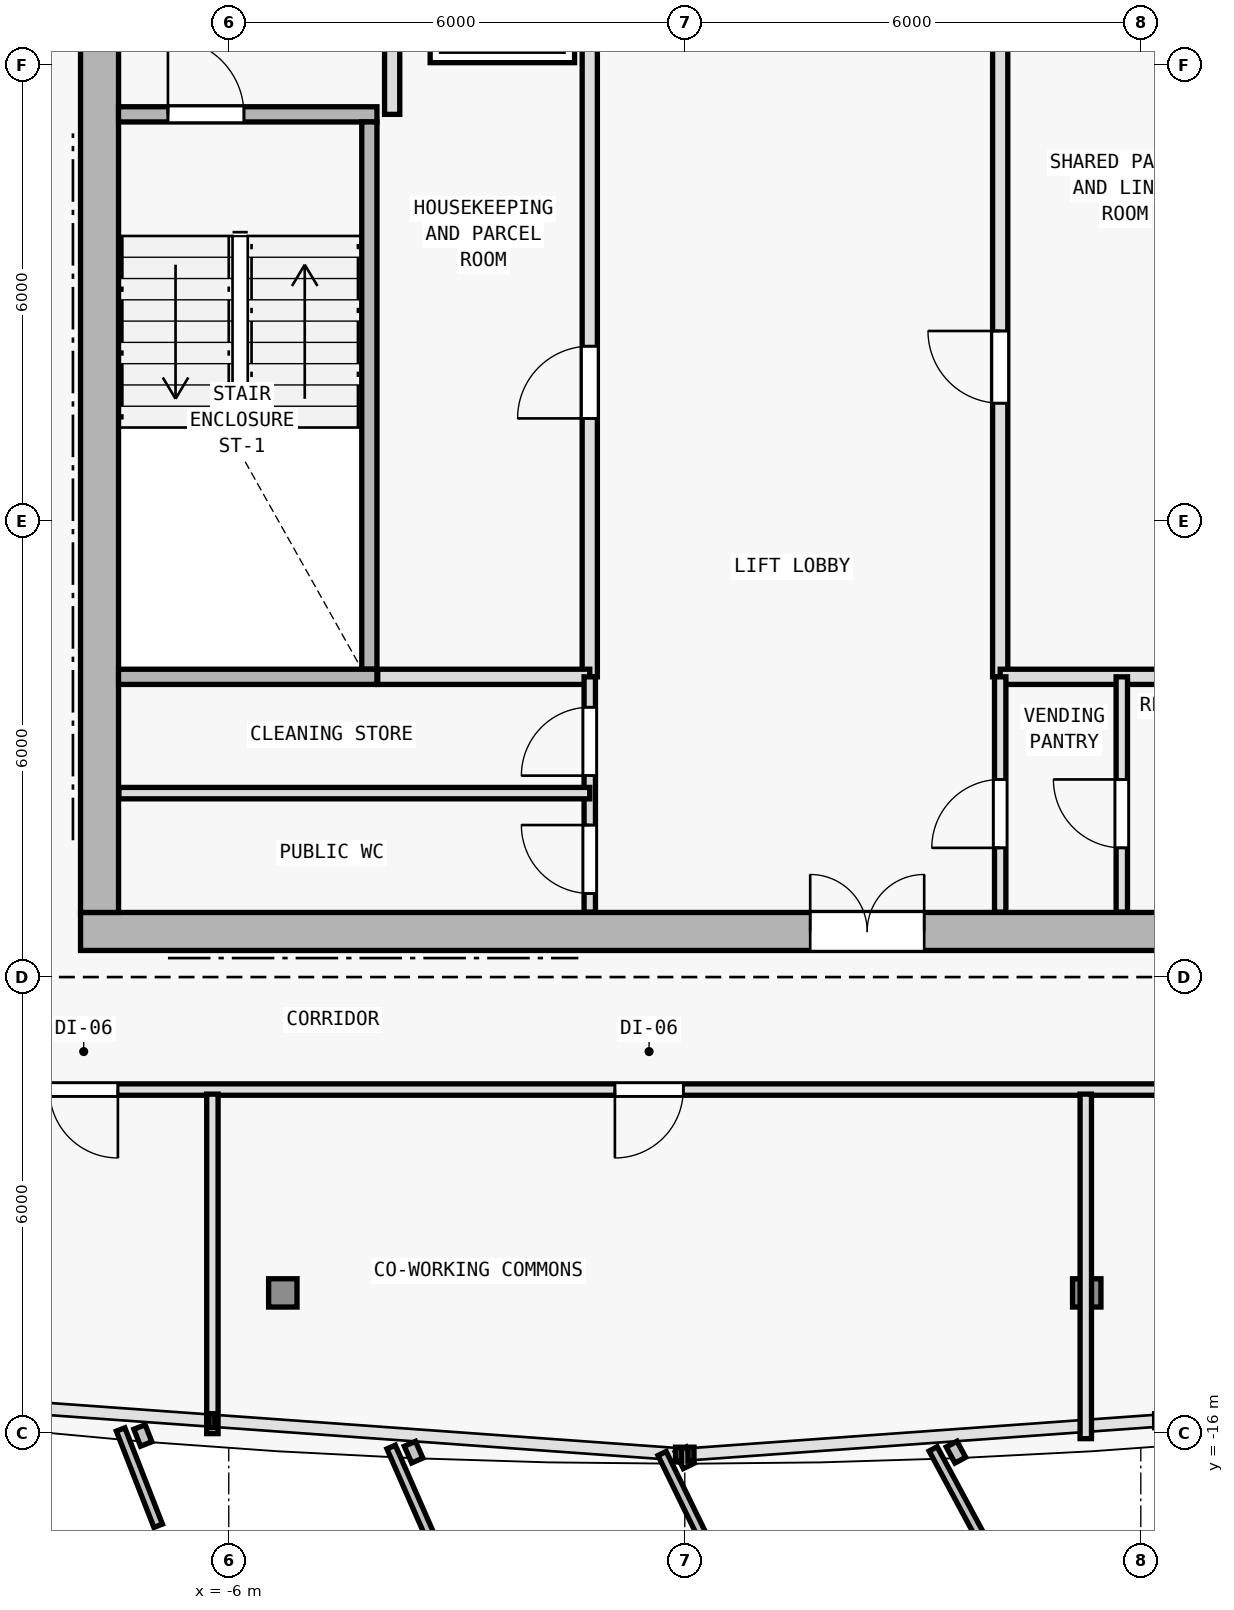
"""IFC4 building model, lengths in metres.
Left out: names, types, materials, properties, quantities, classifications, styles, units other than length and angle.
Written with IfcOpenShell. Run it as: python <this file> out.ifc"""

import sys

from ifc_helpers import new_model, si_unit, direction, frame, frame_2d, origin, origin_2d, place, context, subcontext, project, spatial, rectangle, i_section, extrude, element, fill, save


model = new_model("IFC4")
c1 = context("Model", 3, precision=1e-05, world=origin(), true_north=direction((0.0, 1.0)))
c2 = subcontext(c1, "Body", "Model", "MODEL_VIEW")
j1 = project(units=[si_unit("LENGTHUNIT", "METRE"), si_unit("PLANEANGLEUNIT", "RADIAN")], contexts=[c1])
p1 = place(None, origin())
s1 = spatial("IfcSite", under=j1, at=p1, CompositionType="ELEMENT")
p2 = place(p1, origin())
s2 = spatial("IfcBuilding", under=s1, at=p2, CompositionType="ELEMENT")
p3 = place(p2, frame((0.0, 0.0, 258.0)))
s3 = spatial("IfcBuildingStorey", under=s2, at=p3, CompositionType="ELEMENT", Elevation=258.0)
for number, where, z_axis, x_axis in (
    (1, (-7.7, -9.4, 0.0), (0.0, 0.0, 1.0), (1.0, 0.0, 0.0)),
    (2, (0.0, -9.4, 0.0), (0.0, 0.0, 1.0), (1.0, 0.0, 0.0)),
    (3, (-7.7, 2.0, 0.0), (0.0, 0.0, 1.0), (1.0, 0.0, 0.0)),
):
    element("IfcColumn", number, at=place(p3, frame(where, z_axis=z_axis, x_axis=x_axis)), inside=s3, PredefinedType="COLUMN", context=c2, shape_type="SweptSolid", body=[
        extrude(i_section(OverallWidth=0.374, OverallDepth=0.372, WebThickness=0.012, FlangeThickness=0.02, FilletRadius=0.015, at=origin_2d()), origin(), (0.0, 0.0, 1.0), 3.6),
    ])
for number, where, z_axis, x_axis in (
    (4, (-5.289, -14.155, 0.006), (0.007, 0.035, 0.999), (-0.981, 0.193, 0.0)),
    (5, (5.289, -14.155, 0.006), (-0.007, 0.035, 0.999), (-0.981, -0.193, 0.0)),
):
    element("IfcColumn", number, at=place(p3, frame(where, z_axis=z_axis, x_axis=x_axis)), inside=s3, PredefinedType="COLUMN", context=c2, shape_type="SweptSolid", body=[
        extrude(i_section(OverallWidth=0.374, OverallDepth=0.372, WebThickness=0.012, FlangeThickness=0.02, FilletRadius=0.015, at=origin_2d()), origin(), (0.0, 0.0, 1.0), 3.591),
    ])
p4 = place(p3, frame((-7.95, -9.4, 0.0), z_axis=(0.0, 0.0, 1.0), x_axis=(1.0, 0.0, 0.0)))
e6 = element("IfcWall", 6, at=p4, inside=s3, PredefinedType="SHEAR", context=c2, shape_type="SweptSolid", body=[
    extrude(rectangle(XDim=15.9, YDim=0.5, at=frame_2d((7.95, 0.0))), origin(), (0.0, 0.0, 1.0), 3.35),
])
p5 = place(p4, frame((9.6, 0.0, 0.0)))
e7 = element("IfcOpeningElement", 7, at=p5, cuts=e6, PredefinedType="OPENING", context=c2, shape_type="SweptSolid", body=[
    extrude(rectangle(XDim=1.5, YDim=2.2, at=frame_2d((0.75, 1.1))), frame((0.0, 0.26, 0.0), z_axis=(0.0, -1.0, 0.0), x_axis=(1.0, 0.0, 0.0)), (0.0, 0.0, 1.0), 0.52),
])
p6 = place(p3, frame((-7.7, -9.15, 0.0), z_axis=(0.0, 0.0, 1.0), x_axis=(0.0, 1.0, 0.0)))
e8 = element("IfcWall", 8, at=p6, inside=s3, PredefinedType="SHEAR", context=c2, shape_type="SweptSolid", body=[
    extrude(rectangle(XDim=19.1, YDim=0.5, at=frame_2d((9.55, 0.0))), origin(), (0.0, 0.0, 1.0), 3.35),
])
p7 = place(p6, frame((12.7, 0.0, 0.0)))
e9 = element("IfcOpeningElement", 9, at=p7, cuts=e8, PredefinedType="OPENING", context=c2, shape_type="SweptSolid", body=[
    extrude(rectangle(XDim=1.1, YDim=2.15, at=frame_2d((0.55, 1.075))), frame((0.0, 0.26, 0.0), z_axis=(0.0, -1.0, 0.0), x_axis=(1.0, 0.0, 0.0)), (0.0, 0.0, 1.0), 0.52),
])
p8 = place(p3, frame((-7.45, 1.35, 0.0), z_axis=(0.0, 0.0, 1.0), x_axis=(1.0, 0.0, 0.0)))
e10 = element("IfcWall", 10, at=p8, inside=s3, PredefinedType="SOLIDWALL", context=c2, shape_type="SweptSolid", body=[
    extrude(rectangle(XDim=3.4, YDim=0.2, at=frame_2d((1.7, 0.0))), origin(), (0.0, 0.0, 1.0), 3.35),
])
p9 = place(p8, frame((0.65, 0.0, 0.0)))
e11 = element("IfcOpeningElement", 11, at=p9, cuts=e10, PredefinedType="OPENING", context=c2, shape_type="SweptSolid", body=[
    extrude(rectangle(XDim=1.0, YDim=2.15, at=frame_2d((0.5, 1.075))), frame((0.0, 0.11, 0.0), z_axis=(0.0, -1.0, 0.0), x_axis=(1.0, 0.0, 0.0)), (0.0, 0.0, 1.0), 0.22),
])
p10 = place(p3, frame((-4.15, -5.95, 0.0), z_axis=(0.0, 0.0, 1.0), x_axis=(0.0, 1.0, 0.0)))
e12 = element("IfcWall", 12, at=p10, inside=s3, PredefinedType="SOLIDWALL", context=c2, shape_type="SweptSolid", body=[
    extrude(rectangle(XDim=7.2, YDim=0.2, at=frame_2d((3.6, 0.0))), origin(), (0.0, 0.0, 1.0), 3.35),
])
p11 = place(p3, frame((-3.85, 1.35, 0.0), z_axis=(0.0, 0.0, 1.0), x_axis=(0.0, 1.0, 0.0)))
e13 = element("IfcWall", 13, at=p11, inside=s3, PredefinedType="SOLIDWALL", context=c2, shape_type="SweptSolid", body=[
    extrude(rectangle(XDim=8.595, YDim=0.2, at=frame_2d((4.297, 0.0))), origin(), (0.0, 0.0, 1.0), 3.35),
])
p12 = place(p11, frame((1.5, 0.0, 0.0)))
e14 = element("IfcOpeningElement", 14, at=p12, cuts=e13, PredefinedType="OPENING", context=c2, shape_type="SweptSolid", body=[
    extrude(rectangle(XDim=1.0, YDim=2.15, at=frame_2d((0.5, 1.075))), frame((0.0, 0.11, 0.0), z_axis=(0.0, -1.0, 0.0), x_axis=(1.0, 0.0, 0.0)), (0.0, 0.0, 1.0), 0.22),
])
p13 = place(p11, frame((3.18, 0.0, 0.0)))
e15 = element("IfcOpeningElement", 15, at=p13, cuts=e13, PredefinedType="OPENING", context=c2, shape_type="SweptSolid", body=[
    extrude(rectangle(XDim=1.0, YDim=2.15, at=frame_2d((0.5, 1.075))), frame((0.0, 0.11, 0.0), z_axis=(0.0, -1.0, 0.0), x_axis=(1.0, 0.0, 0.0)), (0.0, 0.0, 1.0), 0.22),
])
p14 = place(p3, frame((4.15, -6.05, 0.0), z_axis=(0.0, 0.0, 1.0), x_axis=(0.0, 1.0, 0.0)))
e16 = element("IfcWall", 16, at=p14, inside=s3, PredefinedType="SOLIDWALL", context=c2, shape_type="SweptSolid", body=[
    extrude(rectangle(XDim=8.7, YDim=0.2, at=frame_2d((4.35, 0.0))), origin(), (0.0, 0.0, 1.0), 3.35),
])
p15 = place(p14, frame((3.6, 0.0, 0.0)))
e17 = element("IfcOpeningElement", 17, at=p15, cuts=e16, PredefinedType="OPENING", context=c2, shape_type="SweptSolid", body=[
    extrude(rectangle(XDim=0.95, YDim=2.1, at=frame_2d((0.475, 1.05))), frame((0.0, 0.11, 0.0), z_axis=(0.0, -1.0, 0.0), x_axis=(1.0, 0.0, 0.0)), (0.0, 0.0, 1.0), 0.22),
])
p16 = place(p3, frame((-1.25, -6.05, 0.0), z_axis=(0.0, 0.0, 1.0), x_axis=(0.0, 1.0, 0.0)))
e18 = element("IfcWall", 18, at=p16, inside=s3, PredefinedType="SOLIDWALL", context=c2, shape_type="SweptSolid", body=[
    extrude(rectangle(XDim=8.7, YDim=0.2, at=frame_2d((4.35, 0.0))), origin(), (0.0, 0.0, 1.0), 3.35),
])
p17 = place(p16, frame((3.4, 0.0, 0.0)))
e19 = element("IfcOpeningElement", 19, at=p17, cuts=e18, PredefinedType="OPENING", context=c2, shape_type="SweptSolid", body=[
    extrude(rectangle(XDim=0.95, YDim=2.1, at=frame_2d((0.475, 1.05))), frame((0.0, 0.11, 0.0), z_axis=(0.0, -1.0, 0.0), x_axis=(1.0, 0.0, 0.0)), (0.0, 0.0, 1.0), 0.22),
])
p18 = place(p3, frame((-7.45, -6.05, 0.0), z_axis=(0.0, 0.0, 1.0), x_axis=(1.0, 0.0, 0.0)))
e20 = element("IfcWall", 20, at=p18, inside=s3, PredefinedType="SOLIDWALL", context=c2, shape_type="SweptSolid", body=[
    extrude(rectangle(XDim=3.4, YDim=0.2, at=frame_2d((1.7, 0.0))), origin(), (0.0, 0.0, 1.0), 3.35),
])
p19 = place(p3, frame((-4.04, -6.05, 0.0), z_axis=(0.0, 0.0, 1.0), x_axis=(1.0, 0.0, 0.0)))
e21 = element("IfcWall", 21, at=p19, inside=s3, PredefinedType="SOLIDWALL", context=c2, shape_type="SweptSolid", body=[
    extrude(rectangle(XDim=2.79, YDim=0.2, at=frame_2d((1.395, 0.0))), origin(), (0.0, 0.0, 1.0), 3.35),
])
p20 = place(p3, frame((4.15, -6.05, 0.0), z_axis=(0.0, 0.0, 1.0), x_axis=(1.0, 0.0, 0.0)))
e22 = element("IfcWall", 22, at=p20, inside=s3, PredefinedType="SOLIDWALL", context=c2, shape_type="SweptSolid", body=[
    extrude(rectangle(XDim=3.295, YDim=0.2, at=frame_2d((1.647, 0.0))), origin(), (0.0, 0.0, 1.0), 3.35),
])
p21 = place(p3, frame((-1.25, -9.145, 0.0), z_axis=(0.0, 0.0, 1.0), x_axis=(0.0, 1.0, 0.0)))
e23 = element("IfcWall", 23, at=p21, inside=s3, PredefinedType="PARTITIONING", context=c2, shape_type="SweptSolid", body=[
    extrude(rectangle(XDim=3.095, YDim=0.15, at=frame_2d((1.547, 0.0))), origin(), (0.0, 0.0, 1.0), 3.35),
])
p22 = place(p21, frame((1.795, 0.0, 0.0)))
e24 = element("IfcOpeningElement", 24, at=p22, cuts=e23, PredefinedType="OPENING", context=c2, shape_type="SweptSolid", body=[
    extrude(rectangle(XDim=0.9, YDim=2.1, at=frame_2d((0.45, 1.05))), frame((0.0, 0.085, 0.0), z_axis=(0.0, -1.0, 0.0), x_axis=(1.0, 0.0, 0.0)), (0.0, 0.0, 1.0), 0.17),
])
p23 = place(p21, frame((0.245, 0.0, 0.0)))
e25 = element("IfcOpeningElement", 25, at=p23, cuts=e23, PredefinedType="OPENING", context=c2, shape_type="SweptSolid", body=[
    extrude(rectangle(XDim=0.9, YDim=2.1, at=frame_2d((0.45, 1.05))), frame((0.0, 0.085, 0.0), z_axis=(0.0, -1.0, 0.0), x_axis=(1.0, 0.0, 0.0)), (0.0, 0.0, 1.0), 0.17),
])
p24 = place(p3, frame((4.15, -9.145, 0.0), z_axis=(0.0, 0.0, 1.0), x_axis=(0.0, 1.0, 0.0)))
e26 = element("IfcWall", 26, at=p24, inside=s3, PredefinedType="PARTITIONING", context=c2, shape_type="SweptSolid", body=[
    extrude(rectangle(XDim=3.095, YDim=0.15, at=frame_2d((1.547, 0.0))), origin(), (0.0, 0.0, 1.0), 3.35),
])
p25 = place(p24, frame((0.845, 0.0, 0.0)))
e27 = element("IfcOpeningElement", 27, at=p25, cuts=e26, PredefinedType="OPENING", context=c2, shape_type="SweptSolid", body=[
    extrude(rectangle(XDim=0.9, YDim=2.1, at=frame_2d((0.45, 1.05))), frame((0.0, 0.085, 0.0), z_axis=(0.0, -1.0, 0.0), x_axis=(1.0, 0.0, 0.0)), (0.0, 0.0, 1.0), 0.17),
])
p26 = place(p3, frame((-7.445, -7.58, 0.0), z_axis=(0.0, 0.0, 1.0), x_axis=(1.0, 0.0, 0.0)))
e28 = element("IfcWall", 28, at=p26, inside=s3, PredefinedType="PARTITIONING", context=c2, shape_type="SweptSolid", body=[
    extrude(rectangle(XDim=6.195, YDim=0.15, at=frame_2d((3.098, 0.0))), origin(), (0.0, 0.0, 1.0), 3.35),
])
p27 = place(p3, frame((5.75, -9.145, 0.0), z_axis=(0.0, 0.0, 1.0), x_axis=(0.0, 1.0, 0.0)))
e29 = element("IfcWall", 29, at=p27, inside=s3, PredefinedType="PARTITIONING", context=c2, shape_type="SweptSolid", body=[
    extrude(rectangle(XDim=3.095, YDim=0.15, at=frame_2d((1.547, 0.0))), origin(), (0.0, 0.0, 1.0), 3.35),
])
p28 = place(p27, frame((0.845, 0.0, 0.0)))
e30 = element("IfcOpeningElement", 30, at=p28, cuts=e29, PredefinedType="OPENING", context=c2, shape_type="SweptSolid", body=[
    extrude(rectangle(XDim=0.9, YDim=2.1, at=frame_2d((0.45, 1.05))), frame((0.0, 0.085, 0.0), z_axis=(0.0, -1.0, 0.0), x_axis=(1.0, 0.0, 0.0)), (0.0, 0.0, 1.0), 0.17),
])
p29 = place(p3, frame((9.78, -11.48, 0.0), z_axis=(0.0, 0.0, 1.0), x_axis=(-1.0, 0.0, 0.0)))
e31 = element("IfcWall", 31, at=p29, inside=s3, PredefinedType="PARTITIONING", context=c2, shape_type="SweptSolid", body=[
    extrude(rectangle(XDim=19.56, YDim=0.15, at=frame_2d((9.78, 0.0))), origin(), (0.0, 0.0, 1.0), 2.725),
])
p30 = place(p29, frame((17.239, 0.0, 0.0)))
e32 = element("IfcOpeningElement", 32, at=p30, cuts=e31, PredefinedType="OPENING", context=c2, shape_type="SweptSolid", body=[
    extrude(rectangle(XDim=0.9, YDim=2.1, at=frame_2d((0.45, 1.05))), frame((0.0, 0.085, 0.0), z_axis=(0.0, -1.0, 0.0), x_axis=(1.0, 0.0, 0.0)), (0.0, 0.0, 1.0), 0.17),
])
p31 = place(p29, frame((9.8, 0.0, 0.0)))
e33 = element("IfcOpeningElement", 33, at=p31, cuts=e31, PredefinedType="OPENING", context=c2, shape_type="SweptSolid", body=[
    extrude(rectangle(XDim=0.9, YDim=2.1, at=frame_2d((0.45, 1.05))), frame((0.0, 0.085, 0.0), z_axis=(0.0, -1.0, 0.0), x_axis=(1.0, 0.0, 0.0)), (0.0, 0.0, 1.0), 0.17),
])
p32 = place(p29, frame((1.891, 0.0, 0.0)))
e34 = element("IfcOpeningElement", 34, at=p32, cuts=e31, PredefinedType="OPENING", context=c2, shape_type="SweptSolid", body=[
    extrude(rectangle(XDim=0.9, YDim=2.1, at=frame_2d((0.45, 1.05))), frame((0.0, 0.085, 0.0), z_axis=(0.0, -1.0, 0.0), x_axis=(1.0, 0.0, 0.0)), (0.0, 0.0, 1.0), 0.17),
])
p33 = place(p3, frame((5.276, -11.54, 0.0), z_axis=(0.0, 0.0, 1.0), x_axis=(0.0, -1.0, 0.0)))
e35 = element("IfcWall", 35, at=p33, inside=s3, PredefinedType="PARTITIONING", context=c2, shape_type="SweptSolid", body=[
    extrude(rectangle(XDim=4.532, YDim=0.15, at=frame_2d((2.266, 0.0))), origin(), (0.0, 0.0, 1.0), 2.725),
])
p34 = place(p3, frame((-6.215, -11.54, 0.0), z_axis=(0.0, 0.0, 1.0), x_axis=(0.0, -1.0, 0.0)))
e36 = element("IfcWall", 36, at=p34, inside=s3, PredefinedType="PARTITIONING", context=c2, shape_type="SweptSolid", body=[
    extrude(rectangle(XDim=4.467, YDim=0.15, at=frame_2d((2.233, 0.0))), origin(), (0.0, 0.0, 1.0), 2.995),
])
p35 = place(p5, origin())
e37 = element("IfcDoor", 37, at=p35, inside=s3, OperationType="DOUBLE_DOOR_SINGLE_SWING", PredefinedType="DOOR", context=c2, shape_type="SweptSolid", body=[
    extrude(rectangle(XDim=1.5, YDim=2.2, at=frame_2d((0.75, 1.1))), frame((0.0, 0.025, 0.0), z_axis=(0.0, -1.0, 0.0), x_axis=(1.0, 0.0, 0.0)), (0.0, 0.0, 1.0), 0.05),
])
fill(e7, e37)
p36 = place(p9, origin())
e38 = element("IfcDoor", 38, at=p36, inside=s3, OperationType="SINGLE_SWING_LEFT", PredefinedType="DOOR", context=c2, shape_type="SweptSolid", body=[
    extrude(rectangle(XDim=1.0, YDim=2.15, at=frame_2d((0.5, 1.075))), frame((0.0, 0.025, 0.0), z_axis=(0.0, -1.0, 0.0), x_axis=(1.0, 0.0, 0.0)), (0.0, 0.0, 1.0), 0.05),
])
fill(e11, e38)
p37 = place(p15, origin())
e39 = element("IfcDoor", 39, at=p37, inside=s3, OperationType="SINGLE_SWING_RIGHT", PredefinedType="DOOR", context=c2, shape_type="SweptSolid", body=[
    extrude(rectangle(XDim=0.95, YDim=2.1, at=frame_2d((0.475, 1.05))), frame((0.0, 0.025, 0.0), z_axis=(0.0, -1.0, 0.0), x_axis=(1.0, 0.0, 0.0)), (0.0, 0.0, 1.0), 0.05),
])
fill(e17, e39)
p38 = place(p17, origin())
e40 = element("IfcDoor", 40, at=p38, inside=s3, OperationType="SINGLE_SWING_LEFT", PredefinedType="DOOR", context=c2, shape_type="SweptSolid", body=[
    extrude(rectangle(XDim=0.95, YDim=2.1, at=frame_2d((0.475, 1.05))), frame((0.0, 0.025, 0.0), z_axis=(0.0, -1.0, 0.0), x_axis=(1.0, 0.0, 0.0)), (0.0, 0.0, 1.0), 0.05),
])
fill(e19, e40)
p39 = place(p22, origin())
e41 = element("IfcDoor", 41, at=p39, inside=s3, OperationType="SINGLE_SWING_LEFT", PredefinedType="DOOR", context=c2, shape_type="SweptSolid", body=[
    extrude(rectangle(XDim=0.9, YDim=2.1, at=frame_2d((0.45, 1.05))), frame((0.0, 0.025, 0.0), z_axis=(0.0, -1.0, 0.0), x_axis=(1.0, 0.0, 0.0)), (0.0, 0.0, 1.0), 0.05),
])
fill(e24, e41)
p40 = place(p23, origin())
e42 = element("IfcDoor", 42, at=p40, inside=s3, OperationType="SINGLE_SWING_RIGHT", PredefinedType="DOOR", context=c2, shape_type="SweptSolid", body=[
    extrude(rectangle(XDim=0.9, YDim=2.1, at=frame_2d((0.45, 1.05))), frame((0.0, 0.025, 0.0), z_axis=(0.0, -1.0, 0.0), x_axis=(1.0, 0.0, 0.0)), (0.0, 0.0, 1.0), 0.05),
])
fill(e25, e42)
p41 = place(p25, origin())
e43 = element("IfcDoor", 43, at=p41, inside=s3, OperationType="SINGLE_SWING_LEFT", PredefinedType="DOOR", context=c2, shape_type="SweptSolid", body=[
    extrude(rectangle(XDim=0.9, YDim=2.1, at=frame_2d((0.45, 1.05))), frame((0.0, 0.025, 0.0), z_axis=(0.0, -1.0, 0.0), x_axis=(1.0, 0.0, 0.0)), (0.0, 0.0, 1.0), 0.05),
])
fill(e27, e43)
p42 = place(p28, origin())
e44 = element("IfcDoor", 44, at=p42, inside=s3, OperationType="SINGLE_SWING_RIGHT", PredefinedType="DOOR", context=c2, shape_type="SweptSolid", body=[
    extrude(rectangle(XDim=0.9, YDim=2.1, at=frame_2d((0.45, 1.05))), frame((0.0, 0.025, 0.0), z_axis=(0.0, -1.0, 0.0), x_axis=(1.0, 0.0, 0.0)), (0.0, 0.0, 1.0), 0.05),
])
fill(e30, e44)
p43 = place(p30, origin())
e45 = element("IfcDoor", 45, at=p43, inside=s3, OperationType="SINGLE_SWING_LEFT", PredefinedType="DOOR", context=c2, shape_type="SweptSolid", body=[
    extrude(rectangle(XDim=0.9, YDim=2.1, at=frame_2d((0.45, 1.05))), frame((0.0, 0.025, 0.0), z_axis=(0.0, -1.0, 0.0), x_axis=(1.0, 0.0, 0.0)), (0.0, 0.0, 1.0), 0.05),
])
fill(e32, e45)
p44 = place(p31, origin())
e46 = element("IfcDoor", 46, at=p44, inside=s3, OperationType="SINGLE_SWING_RIGHT", PredefinedType="DOOR", context=c2, shape_type="SweptSolid", body=[
    extrude(rectangle(XDim=0.9, YDim=2.1, at=frame_2d((0.45, 1.05))), frame((0.0, 0.025, 0.0), z_axis=(0.0, -1.0, 0.0), x_axis=(1.0, 0.0, 0.0)), (0.0, 0.0, 1.0), 0.05),
])
fill(e33, e46)
save(model, sys.argv[1])
